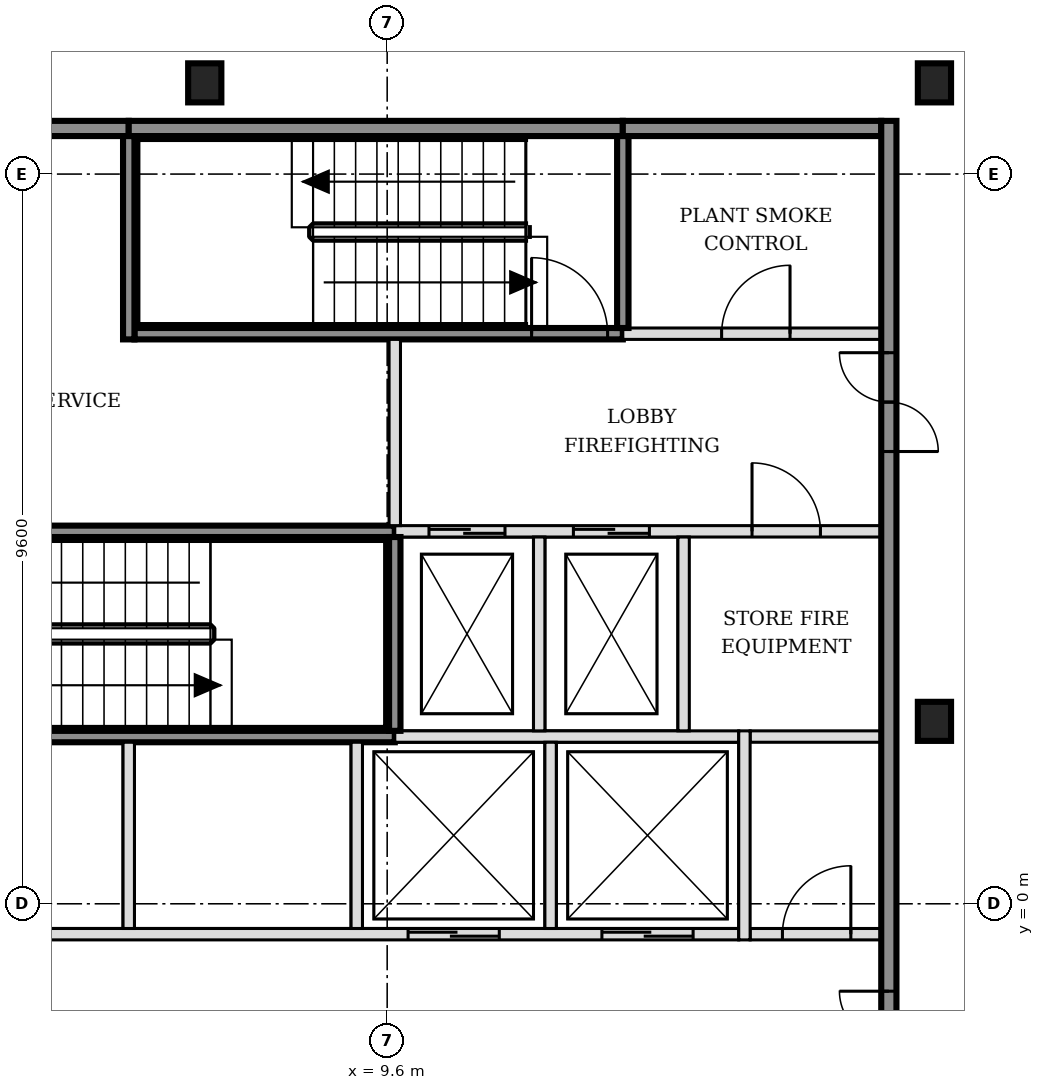
"""IFC4 building model, lengths in metres.
Left out: names, types, materials, properties, quantities, classifications, styles, units other than length and angle.
Written with IfcOpenShell. Run it as: python <this file> out.ifc"""

import sys

from ifc_helpers import new_model, si_unit, direction, frame, frame_2d, origin, origin_2d, place, context, subcontext, project, spatial, rectangle, i_section, extrude, element, fill, save


model = new_model("IFC4")
c1 = context("Model", 3, precision=1e-05, world=origin(), true_north=direction((0.0, 1.0)))
c2 = subcontext(c1, "Body", "Model", "MODEL_VIEW")
j1 = project(units=[si_unit("LENGTHUNIT", "METRE"), si_unit("PLANEANGLEUNIT", "RADIAN")], contexts=[c1])
p1 = place(None, origin())
s1 = spatial("IfcSite", under=j1, at=p1, CompositionType="ELEMENT")
p2 = place(p1, origin())
s2 = spatial("IfcBuilding", under=s1, at=p2, CompositionType="ELEMENT")
p3 = place(p2, frame((0.0, 0.0, 83.4)))
s3 = spatial("IfcBuildingStorey", under=s2, at=p3, CompositionType="ELEMENT", Elevation=83.4)
for number, where, z_axis, x_axis in (
    (1, (16.8, 2.4, -0.15), (0.0, 0.0, 1.0), (1.0, 0.0, 0.0)),
    (2, (7.2, 10.8, -0.15), (0.0, 0.0, 1.0), (1.0, 0.0, 0.0)),
    (3, (16.8, 10.8, -0.15), (0.0, 0.0, 1.0), (1.0, 0.0, 0.0)),
):
    element("IfcColumn", number, at=place(p3, frame(where, z_axis=z_axis, x_axis=x_axis)), inside=s3, PredefinedType="COLUMN", context=c2, shape_type="SweptSolid", body=[
        extrude(i_section(OverallWidth=0.437, OverallDepth=0.514, WebThickness=0.061, FlangeThickness=0.097, FilletRadius=0.015, at=origin_2d()), origin(), (0.0, 0.0, 1.0), 3.6),
    ])
p4 = place(p3, frame((-1.7, -0.4, 0.0), z_axis=(0.0, 0.0, 1.0), x_axis=(1.0, 0.0, 0.0)))
e4 = element("IfcWall", 4, at=p4, inside=s3, PredefinedType="SOLIDWALL", context=c2, shape_type="SweptSolid", body=[
    extrude(rectangle(XDim=15.925, YDim=0.15, at=frame_2d((7.962, 0.0))), origin(), (0.0, 0.0, 1.0), 3.45),
])
p5 = place(p4, frame((0.6, 0.0, 0.0)))
e5 = element("IfcOpeningElement", 5, at=p5, cuts=e4, PredefinedType="OPENING", context=c2, shape_type="SweptSolid", body=[
    extrude(rectangle(XDim=1.1, YDim=2.1, at=frame_2d((0.55, 1.05))), frame((0.0, 0.085, 0.0), z_axis=(0.0, -1.0, 0.0), x_axis=(1.0, 0.0, 0.0)), (0.0, 0.0, 1.0), 0.17),
])
p6 = place(p4, frame((3.1, 0.0, 0.0)))
e6 = element("IfcOpeningElement", 6, at=p6, cuts=e4, PredefinedType="OPENING", context=c2, shape_type="SweptSolid", body=[
    extrude(rectangle(XDim=1.1, YDim=2.1, at=frame_2d((0.55, 1.05))), frame((0.0, 0.085, 0.0), z_axis=(0.0, -1.0, 0.0), x_axis=(1.0, 0.0, 0.0)), (0.0, 0.0, 1.0), 0.17),
])
p7 = place(p4, frame((11.575, 0.0, 0.0)))
e7 = element("IfcOpeningElement", 7, at=p7, cuts=e4, PredefinedType="OPENING", context=c2, shape_type="SweptSolid", body=[
    extrude(rectangle(XDim=1.2, YDim=2.1, at=frame_2d((0.6, 1.05))), frame((0.0, 0.085, 0.0), z_axis=(0.0, -1.0, 0.0), x_axis=(1.0, 0.0, 0.0)), (0.0, 0.0, 1.0), 0.17),
])
p8 = place(p4, frame((14.125, 0.0, 0.0)))
e8 = element("IfcOpeningElement", 8, at=p8, cuts=e4, PredefinedType="OPENING", context=c2, shape_type="SweptSolid", body=[
    extrude(rectangle(XDim=1.2, YDim=2.1, at=frame_2d((0.6, 1.05))), frame((0.0, 0.085, 0.0), z_axis=(0.0, -1.0, 0.0), x_axis=(1.0, 0.0, 0.0)), (0.0, 0.0, 1.0), 0.17),
])
p9 = place(p3, frame((14.375, -0.4, 0.0), z_axis=(0.0, 0.0, 1.0), x_axis=(1.0, 0.0, 0.0)))
e9 = element("IfcWall", 9, at=p9, inside=s3, PredefinedType="PARTITIONING", context=c2, shape_type="SweptSolid", body=[
    extrude(rectangle(XDim=1.725, YDim=0.15, at=frame_2d((0.863, 0.0))), origin(), (0.0, 0.0, 1.0), 3.45),
])
p10 = place(p9, frame((0.425, 0.0, 0.0)))
e10 = element("IfcOpeningElement", 10, at=p10, cuts=e9, PredefinedType="OPENING", context=c2, shape_type="SweptSolid", body=[
    extrude(rectangle(XDim=0.9, YDim=2.1, at=frame_2d((0.45, 1.05))), frame((0.0, 0.085, 0.0), z_axis=(0.0, -1.0, 0.0), x_axis=(1.0, 0.0, 0.0)), (0.0, 0.0, 1.0), 0.17),
])
p11 = place(p3, frame((3.2, 2.2, 0.0), z_axis=(0.0, 0.0, 1.0), x_axis=(1.0, 0.0, 0.0)))
e11 = element("IfcWall", 11, at=p11, inside=s3, PredefinedType="SOLIDWALL", context=c2, shape_type="SweptSolid", body=[
    extrude(rectangle(XDim=6.5, YDim=0.15, at=frame_2d((3.25, 0.0))), origin(), (0.0, 0.0, 1.0), 3.45),
])
p12 = place(p3, frame((9.7, 2.2, 0.0), z_axis=(0.0, 0.0, 1.0), x_axis=(1.0, 0.0, 0.0)))
e12 = element("IfcWall", 12, at=p12, inside=s3, PredefinedType="SOLIDWALL", context=c2, shape_type="SweptSolid", body=[
    extrude(rectangle(XDim=4.525, YDim=0.15, at=frame_2d((2.263, 0.0))), origin(), (0.0, 0.0, 1.0), 3.45),
])
p13 = place(p3, frame((14.375, 2.2, 0.0), z_axis=(0.0, 0.0, 1.0), x_axis=(1.0, 0.0, 0.0)))
e13 = element("IfcWall", 13, at=p13, inside=s3, PredefinedType="PARTITIONING", context=c2, shape_type="SweptSolid", body=[
    extrude(rectangle(XDim=1.725, YDim=0.15, at=frame_2d((0.863, 0.0))), origin(), (0.0, 0.0, 1.0), 3.45),
])
p14 = place(p3, frame((3.275, 4.9, 0.0), z_axis=(0.0, 0.0, 1.0), x_axis=(1.0, 0.0, 0.0)))
e14 = element("IfcWall", 14, at=p14, inside=s3, PredefinedType="SOLIDWALL", context=c2, shape_type="SweptSolid", body=[
    extrude(rectangle(XDim=6.425, YDim=0.15, at=frame_2d((3.212, 0.0))), origin(), (0.0, 0.0, 1.0), 3.45),
])
p15 = place(p14, frame((0.1, 0.0, 0.0)))
e15 = element("IfcOpeningElement", 15, at=p15, cuts=e14, PredefinedType="OPENING", context=c2, shape_type="SweptSolid", body=[
    extrude(rectangle(XDim=1.0, YDim=2.1, at=frame_2d((0.5, 1.05))), frame((0.0, 0.085, 0.0), z_axis=(0.0, -1.0, 0.0), x_axis=(1.0, 0.0, 0.0)), (0.0, 0.0, 1.0), 0.17),
])
p16 = place(p3, frame((9.7, 4.9, 0.0), z_axis=(0.0, 0.0, 1.0), x_axis=(1.0, 0.0, 0.0)))
e16 = element("IfcWall", 16, at=p16, inside=s3, PredefinedType="SOLIDWALL", context=c2, shape_type="SweptSolid", body=[
    extrude(rectangle(XDim=6.4, YDim=0.15, at=frame_2d((3.2, 0.0))), origin(), (0.0, 0.0, 1.0), 3.45),
])
p17 = place(p16, frame((0.45, 0.0, 0.0)))
e17 = element("IfcOpeningElement", 17, at=p17, cuts=e16, PredefinedType="OPENING", context=c2, shape_type="SweptSolid", body=[
    extrude(rectangle(XDim=1.0, YDim=2.1, at=frame_2d((0.5, 1.05))), frame((0.0, 0.085, 0.0), z_axis=(0.0, -1.0, 0.0), x_axis=(1.0, 0.0, 0.0)), (0.0, 0.0, 1.0), 0.17),
])
p18 = place(p16, frame((2.35, 0.0, 0.0)))
e18 = element("IfcOpeningElement", 18, at=p18, cuts=e16, PredefinedType="OPENING", context=c2, shape_type="SweptSolid", body=[
    extrude(rectangle(XDim=1.0, YDim=2.1, at=frame_2d((0.5, 1.05))), frame((0.0, 0.085, 0.0), z_axis=(0.0, -1.0, 0.0), x_axis=(1.0, 0.0, 0.0)), (0.0, 0.0, 1.0), 0.17),
])
p19 = place(p16, frame((4.7, 0.0, 0.0)))
e19 = element("IfcOpeningElement", 19, at=p19, cuts=e16, PredefinedType="OPENING", context=c2, shape_type="SweptSolid", body=[
    extrude(rectangle(XDim=0.9, YDim=2.1, at=frame_2d((0.45, 1.05))), frame((0.0, 0.085, 0.0), z_axis=(0.0, -1.0, 0.0), x_axis=(1.0, 0.0, 0.0)), (0.0, 0.0, 1.0), 0.17),
])
p20 = place(p3, frame((6.275, 7.5, 0.0), z_axis=(0.0, 0.0, 1.0), x_axis=(1.0, 0.0, 0.0)))
e20 = element("IfcWall", 20, at=p20, inside=s3, PredefinedType="SOLIDWALL", context=c2, shape_type="SweptSolid", body=[
    extrude(rectangle(XDim=6.425, YDim=0.15, at=frame_2d((3.212, 0.0))), origin(), (0.0, 0.0, 1.0), 3.45),
])
p21 = place(p20, frame((5.225, 0.0, 0.0)))
e21 = element("IfcOpeningElement", 21, at=p21, cuts=e20, PredefinedType="OPENING", context=c2, shape_type="SweptSolid", body=[
    extrude(rectangle(XDim=1.0, YDim=2.1, at=frame_2d((0.5, 1.05))), frame((0.0, 0.085, 0.0), z_axis=(0.0, -1.0, 0.0), x_axis=(1.0, 0.0, 0.0)), (0.0, 0.0, 1.0), 0.17),
])
p22 = place(p3, frame((12.7, 7.5, 0.0), z_axis=(0.0, 0.0, 1.0), x_axis=(1.0, 0.0, 0.0)))
e22 = element("IfcWall", 22, at=p22, inside=s3, PredefinedType="SOLIDWALL", context=c2, shape_type="SweptSolid", body=[
    extrude(rectangle(XDim=3.4, YDim=0.15, at=frame_2d((1.7, 0.0))), origin(), (0.0, 0.0, 1.0), 3.45),
])
p23 = place(p22, frame((1.3, 0.0, 0.0)))
e23 = element("IfcOpeningElement", 23, at=p23, cuts=e22, PredefinedType="OPENING", context=c2, shape_type="SweptSolid", body=[
    extrude(rectangle(XDim=0.9, YDim=2.1, at=frame_2d((0.45, 1.05))), frame((0.0, 0.085, 0.0), z_axis=(0.0, -1.0, 0.0), x_axis=(1.0, 0.0, 0.0)), (0.0, 0.0, 1.0), 0.17),
])
p24 = place(p3, frame((-1.7, 10.2, 0.0), z_axis=(0.0, 0.0, 1.0), x_axis=(1.0, 0.0, 0.0)))
e24 = element("IfcWall", 24, at=p24, inside=s3, PredefinedType="SOLIDWALL", context=c2, shape_type="SweptSolid", body=[
    extrude(rectangle(XDim=7.9, YDim=0.2, at=frame_2d((3.95, 0.0))), origin(), (0.0, 0.0, 1.0), 3.45),
])
p25 = place(p3, frame((6.2, 10.2, 0.0), z_axis=(0.0, 0.0, 1.0), x_axis=(1.0, 0.0, 0.0)))
e25 = element("IfcWall", 25, at=p25, inside=s3, PredefinedType="SOLIDWALL", context=c2, shape_type="SweptSolid", body=[
    extrude(rectangle(XDim=6.5, YDim=0.2, at=frame_2d((3.25, 0.0))), origin(), (0.0, 0.0, 1.0), 3.45),
])
p26 = place(p3, frame((12.7, 10.2, 0.0), z_axis=(0.0, 0.0, 1.0), x_axis=(1.0, 0.0, 0.0)))
e26 = element("IfcWall", 26, at=p26, inside=s3, PredefinedType="SOLIDWALL", context=c2, shape_type="SweptSolid", body=[
    extrude(rectangle(XDim=3.4, YDim=0.2, at=frame_2d((1.7, 0.0))), origin(), (0.0, 0.0, 1.0), 3.45),
])
p27 = place(p3, frame((6.2, -0.325, 0.0), z_axis=(0.0, 0.0, 1.0), x_axis=(0.0, 1.0, 0.0)))
e27 = element("IfcWall", 27, at=p27, inside=s3, PredefinedType="SOLIDWALL", context=c2, shape_type="SweptSolid", body=[
    extrude(rectangle(XDim=2.45, YDim=0.15, at=frame_2d((1.225, 0.0))), origin(), (0.0, 0.0, 1.0), 3.45),
])
p28 = place(p3, frame((6.2, 7.425, 0.0), z_axis=(0.0, 0.0, 1.0), x_axis=(0.0, 1.0, 0.0)))
e28 = element("IfcWall", 28, at=p28, inside=s3, PredefinedType="SOLIDWALL", context=c2, shape_type="SweptSolid", body=[
    extrude(rectangle(XDim=2.675, YDim=0.15, at=frame_2d((1.337, 0.0))), origin(), (0.0, 0.0, 1.0), 3.45),
])
p29 = place(p3, frame((9.2, -0.325, 0.0), z_axis=(0.0, 0.0, 1.0), x_axis=(0.0, 1.0, 0.0)))
e29 = element("IfcWall", 29, at=p29, inside=s3, PredefinedType="SOLIDWALL", context=c2, shape_type="SweptSolid", body=[
    extrude(rectangle(XDim=2.45, YDim=0.15, at=frame_2d((1.225, 0.0))), origin(), (0.0, 0.0, 1.0), 3.45),
])
p30 = place(p3, frame((9.7, 2.275, 0.0), z_axis=(0.0, 0.0, 1.0), x_axis=(0.0, 1.0, 0.0)))
e30 = element("IfcWall", 30, at=p30, inside=s3, PredefinedType="SOLIDWALL", context=c2, shape_type="SweptSolid", body=[
    extrude(rectangle(XDim=2.55, YDim=0.15, at=frame_2d((1.275, 0.0))), origin(), (0.0, 0.0, 1.0), 3.45),
])
p31 = place(p3, frame((9.7, 4.975, 0.0), z_axis=(0.0, 0.0, 1.0), x_axis=(0.0, 1.0, 0.0)))
e31 = element("IfcWall", 31, at=p31, inside=s3, PredefinedType="SOLIDWALL", context=c2, shape_type="SweptSolid", body=[
    extrude(rectangle(XDim=2.45, YDim=0.15, at=frame_2d((1.225, 0.0))), origin(), (0.0, 0.0, 1.0), 3.45),
])
p32 = place(p3, frame((11.6, 2.275, 0.0), z_axis=(0.0, 0.0, 1.0), x_axis=(0.0, 1.0, 0.0)))
e32 = element("IfcWall", 32, at=p32, inside=s3, PredefinedType="SOLIDWALL", context=c2, shape_type="SweptSolid", body=[
    extrude(rectangle(XDim=2.55, YDim=0.15, at=frame_2d((1.275, 0.0))), origin(), (0.0, 0.0, 1.0), 3.45),
])
p33 = place(p3, frame((11.75, -0.325, 0.0), z_axis=(0.0, 0.0, 1.0), x_axis=(0.0, 1.0, 0.0)))
e33 = element("IfcWall", 33, at=p33, inside=s3, PredefinedType="SOLIDWALL", context=c2, shape_type="SweptSolid", body=[
    extrude(rectangle(XDim=2.45, YDim=0.15, at=frame_2d((1.225, 0.0))), origin(), (0.0, 0.0, 1.0), 3.45),
])
p34 = place(p3, frame((12.7, 7.575, 0.0), z_axis=(0.0, 0.0, 1.0), x_axis=(0.0, 1.0, 0.0)))
e34 = element("IfcWall", 34, at=p34, inside=s3, PredefinedType="SOLIDWALL", context=c2, shape_type="SweptSolid", body=[
    extrude(rectangle(XDim=2.525, YDim=0.15, at=frame_2d((1.263, 0.0))), origin(), (0.0, 0.0, 1.0), 3.45),
])
p35 = place(p3, frame((13.5, 2.275, 0.0), z_axis=(0.0, 0.0, 1.0), x_axis=(0.0, 1.0, 0.0)))
e35 = element("IfcWall", 35, at=p35, inside=s3, PredefinedType="SOLIDWALL", context=c2, shape_type="SweptSolid", body=[
    extrude(rectangle(XDim=2.55, YDim=0.15, at=frame_2d((1.275, 0.0))), origin(), (0.0, 0.0, 1.0), 3.45),
])
p36 = place(p3, frame((14.3, -0.475, 0.0), z_axis=(0.0, 0.0, 1.0), x_axis=(0.0, 1.0, 0.0)))
e36 = element("IfcWall", 36, at=p36, inside=s3, PredefinedType="SOLIDWALL", context=c2, shape_type="SweptSolid", body=[
    extrude(rectangle(XDim=2.75, YDim=0.15, at=frame_2d((1.375, 0.0))), origin(), (0.0, 0.0, 1.0), 3.45),
])
p37 = place(p3, frame((16.2, -5.5, 0.0), z_axis=(0.0, 0.0, 1.0), x_axis=(0.0, 1.0, 0.0)))
e37 = element("IfcWall", 37, at=p37, inside=s3, PredefinedType="SOLIDWALL", context=c2, shape_type="SweptSolid", body=[
    extrude(rectangle(XDim=15.8, YDim=0.2, at=frame_2d((7.9, 0.0))), origin(), (0.0, 0.0, 1.0), 3.45),
])
p38 = place(p37, frame((3.05, 0.0, 0.0)))
e38 = element("IfcOpeningElement", 38, at=p38, cuts=e37, PredefinedType="OPENING", context=c2, shape_type="SweptSolid", body=[
    extrude(rectangle(XDim=1.3, YDim=2.1, at=frame_2d((0.65, 1.05))), frame((0.0, 0.11, 0.0), z_axis=(0.0, -1.0, 0.0), x_axis=(1.0, 0.0, 0.0)), (0.0, 0.0, 1.0), 0.22),
])
p39 = place(p37, frame((11.45, 0.0, 0.0)))
e39 = element("IfcOpeningElement", 39, at=p39, cuts=e37, PredefinedType="OPENING", context=c2, shape_type="SweptSolid", body=[
    extrude(rectangle(XDim=1.3, YDim=2.1, at=frame_2d((0.65, 1.05))), frame((0.0, 0.11, 0.0), z_axis=(0.0, -1.0, 0.0), x_axis=(1.0, 0.0, 0.0)), (0.0, 0.0, 1.0), 0.22),
])
p40 = place(p7, origin())
e40 = element("IfcDoor", 40, at=p40, inside=s3, OperationType="DOUBLE_DOOR_SLIDING", PredefinedType="DOOR", context=c2, shape_type="SweptSolid", body=[
    extrude(rectangle(XDim=1.2, YDim=2.1, at=frame_2d((0.6, 1.05))), frame((0.0, 0.025, 0.0), z_axis=(0.0, -1.0, 0.0), x_axis=(1.0, 0.0, 0.0)), (0.0, 0.0, 1.0), 0.05),
])
fill(e7, e40)
p41 = place(p8, origin())
e41 = element("IfcDoor", 41, at=p41, inside=s3, OperationType="DOUBLE_DOOR_SLIDING", PredefinedType="DOOR", context=c2, shape_type="SweptSolid", body=[
    extrude(rectangle(XDim=1.2, YDim=2.1, at=frame_2d((0.6, 1.05))), frame((0.0, 0.025, 0.0), z_axis=(0.0, -1.0, 0.0), x_axis=(1.0, 0.0, 0.0)), (0.0, 0.0, 1.0), 0.05),
])
fill(e8, e41)
p42 = place(p17, origin())
e42 = element("IfcDoor", 42, at=p42, inside=s3, OperationType="DOUBLE_DOOR_SLIDING", PredefinedType="DOOR", context=c2, shape_type="SweptSolid", body=[
    extrude(rectangle(XDim=1.0, YDim=2.1, at=frame_2d((0.5, 1.05))), frame((0.0, 0.025, 0.0), z_axis=(0.0, -1.0, 0.0), x_axis=(1.0, 0.0, 0.0)), (0.0, 0.0, 1.0), 0.05),
])
fill(e17, e42)
p43 = place(p18, origin())
e43 = element("IfcDoor", 43, at=p43, inside=s3, OperationType="DOUBLE_DOOR_SLIDING", PredefinedType="DOOR", context=c2, shape_type="SweptSolid", body=[
    extrude(rectangle(XDim=1.0, YDim=2.1, at=frame_2d((0.5, 1.05))), frame((0.0, 0.025, 0.0), z_axis=(0.0, -1.0, 0.0), x_axis=(1.0, 0.0, 0.0)), (0.0, 0.0, 1.0), 0.05),
])
fill(e18, e43)
p44 = place(p21, origin())
e44 = element("IfcDoor", 44, at=p44, inside=s3, OperationType="SINGLE_SWING_LEFT", PredefinedType="DOOR", context=c2, shape_type="SweptSolid", body=[
    extrude(rectangle(XDim=1.0, YDim=2.1, at=frame_2d((0.5, 1.05))), frame((0.0, 0.025, 0.0), z_axis=(0.0, -1.0, 0.0), x_axis=(1.0, 0.0, 0.0)), (0.0, 0.0, 1.0), 0.05),
])
fill(e21, e44)
p45 = place(p38, origin())
e45 = element("IfcDoor", 45, at=p45, inside=s3, OperationType="DOUBLE_DOOR_SINGLE_SWING", PredefinedType="DOOR", context=c2, shape_type="SweptSolid", body=[
    extrude(rectangle(XDim=1.3, YDim=2.1, at=frame_2d((0.65, 1.05))), frame((0.0, 0.025, 0.0), z_axis=(0.0, -1.0, 0.0), x_axis=(1.0, 0.0, 0.0)), (0.0, 0.0, 1.0), 0.05),
])
fill(e38, e45)
p46 = place(p39, origin())
e46 = element("IfcDoor", 46, at=p46, inside=s3, OperationType="DOUBLE_DOOR_SINGLE_SWING", PredefinedType="DOOR", context=c2, shape_type="SweptSolid", body=[
    extrude(rectangle(XDim=1.3, YDim=2.1, at=frame_2d((0.65, 1.05))), frame((0.0, 0.025, 0.0), z_axis=(0.0, -1.0, 0.0), x_axis=(1.0, 0.0, 0.0)), (0.0, 0.0, 1.0), 0.05),
])
fill(e39, e46)
p47 = place(p10, origin())
e47 = element("IfcDoor", 47, at=p47, inside=s3, OperationType="SINGLE_SWING_RIGHT", PredefinedType="DOOR", context=c2, shape_type="SweptSolid", body=[
    extrude(rectangle(XDim=0.9, YDim=2.1, at=frame_2d((0.45, 1.05))), frame((0.0, 0.025, 0.0), z_axis=(0.0, -1.0, 0.0), x_axis=(1.0, 0.0, 0.0)), (0.0, 0.0, 1.0), 0.05),
])
fill(e10, e47)
p48 = place(p19, origin())
e48 = element("IfcDoor", 48, at=p48, inside=s3, OperationType="SINGLE_SWING_LEFT", PredefinedType="DOOR", context=c2, shape_type="SweptSolid", body=[
    extrude(rectangle(XDim=0.9, YDim=2.1, at=frame_2d((0.45, 1.05))), frame((0.0, 0.025, 0.0), z_axis=(0.0, -1.0, 0.0), x_axis=(1.0, 0.0, 0.0)), (0.0, 0.0, 1.0), 0.05),
])
fill(e19, e48)
p49 = place(p23, origin())
e49 = element("IfcDoor", 49, at=p49, inside=s3, OperationType="SINGLE_SWING_RIGHT", PredefinedType="DOOR", context=c2, shape_type="SweptSolid", body=[
    extrude(rectangle(XDim=0.9, YDim=2.1, at=frame_2d((0.45, 1.05))), frame((0.0, 0.025, 0.0), z_axis=(0.0, -1.0, 0.0), x_axis=(1.0, 0.0, 0.0)), (0.0, 0.0, 1.0), 0.05),
])
fill(e23, e49)
save(model, sys.argv[1])
